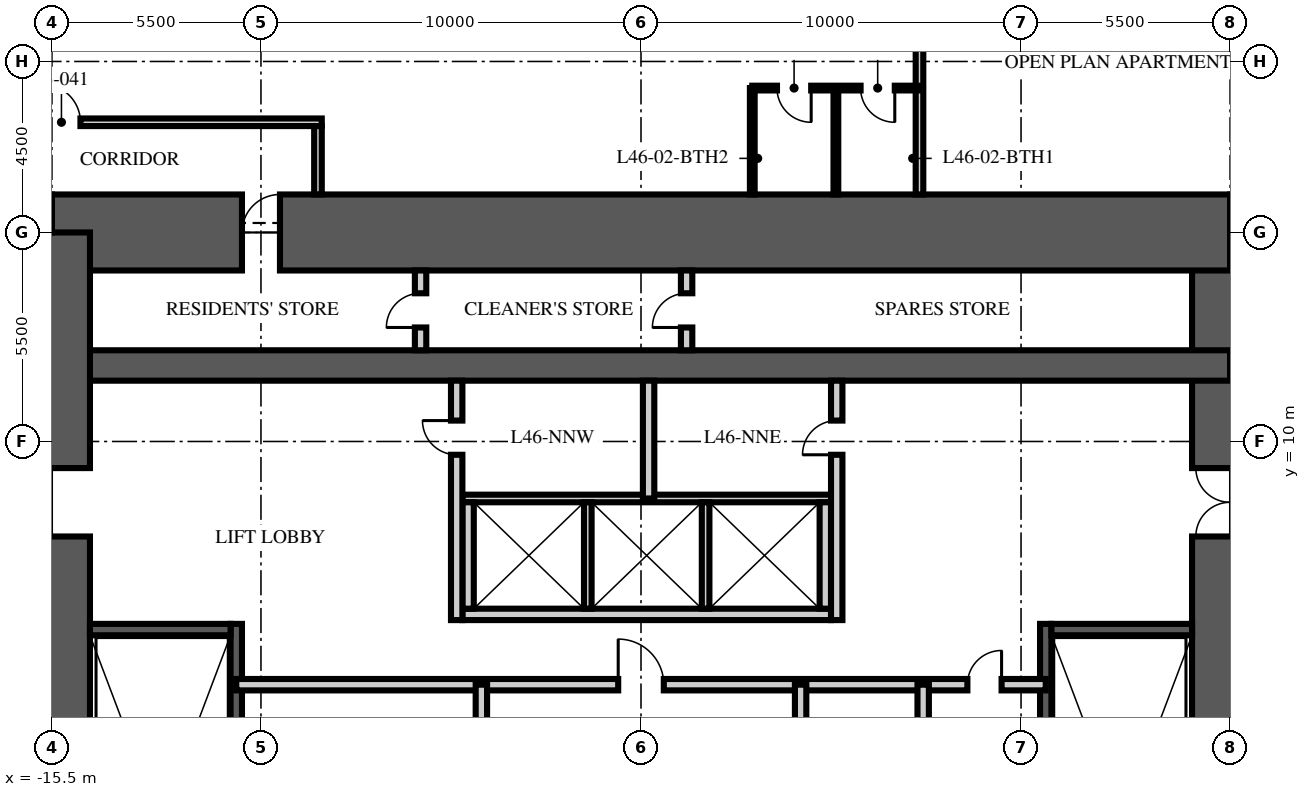
"""IFC4 building model, lengths in metres.
Left out: names, types, materials, properties, quantities, classifications, styles, units other than length and angle.
Written with IfcOpenShell. Run it as: python <this file> out.ifc"""

import sys

from ifc_helpers import new_model, si_unit, direction, frame, frame_2d, origin, place, context, subcontext, project, spatial, rectangle, extrude, element, fill, save


model = new_model("IFC4")
c1 = context("Model", 3, precision=1e-05, world=origin(), true_north=direction((0.0, 1.0)))
c2 = subcontext(c1, "Body", "Model", "MODEL_VIEW")
j1 = project(units=[si_unit("LENGTHUNIT", "METRE"), si_unit("PLANEANGLEUNIT", "RADIAN")], contexts=[c1])
p1 = place(None, origin())
s1 = spatial("IfcSite", under=j1, at=p1, CompositionType="ELEMENT")
p2 = place(p1, origin())
s2 = spatial("IfcBuilding", under=s1, at=p2, CompositionType="ELEMENT")
p3 = place(p2, frame((0.0, 0.0, 182.25)))
s3 = spatial("IfcBuildingStorey", under=s2, at=p3, CompositionType="ELEMENT", Elevation=182.25)
p4 = place(p3, frame((15.5, -15.5, -0.25), z_axis=(0.0, 0.0, 1.0), x_axis=(0.0, 1.0, 0.0)))
e1 = element("IfcWall", 1, at=p4, inside=s3, PredefinedType="SHEAR", context=c2, shape_type="SweptSolid", body=[
    extrude(rectangle(XDim=31.0, YDim=2.0, at=frame_2d((15.5, 0.0))), origin(), (0.0, 0.0, 1.0), 3.7),
])
p5 = place(p4, frame((6.5, 0.0, 0.25)))
e2 = element("IfcOpeningElement", 2, at=p5, cuts=e1, PredefinedType="OPENING", context=c2, shape_type="SweptSolid", body=[
    extrude(rectangle(XDim=1.2, YDim=2.1, at=frame_2d((0.6, 1.05))), frame((0.0, 1.01, 0.0), z_axis=(0.0, -1.0, 0.0), x_axis=(1.0, 0.0, 0.0)), (0.0, 0.0, 1.0), 2.02),
])
p6 = place(p4, frame((23.0, 0.0, 0.25)))
e3 = element("IfcOpeningElement", 3, at=p6, cuts=e1, PredefinedType="OPENING", context=c2, shape_type="SweptSolid", body=[
    extrude(rectangle(XDim=1.8, YDim=2.1, at=frame_2d((0.9, 1.05))), frame((0.0, 1.01, 0.0), z_axis=(0.0, -1.0, 0.0), x_axis=(1.0, 0.0, 0.0)), (0.0, 0.0, 1.0), 2.02),
])
p7 = place(p3, frame((-15.5, 15.5, -0.25), z_axis=(0.0, 0.0, 1.0), x_axis=(1.0, 0.0, 0.0)))
e4 = element("IfcWall", 4, at=p7, inside=s3, PredefinedType="SHEAR", context=c2, shape_type="SweptSolid", body=[
    extrude(rectangle(XDim=31.0, YDim=2.0, at=frame_2d((15.5, 0.0))), origin(), (0.0, 0.0, 1.0), 3.7),
])
p8 = place(p7, frame((5.0, 0.0, 0.25)))
e5 = element("IfcOpeningElement", 5, at=p8, cuts=e4, PredefinedType="OPENING", context=c2, shape_type="SweptSolid", body=[
    extrude(rectangle(XDim=1.0, YDim=2.1, at=frame_2d((0.5, 1.05))), frame((0.0, 1.01, 0.0), z_axis=(0.0, -1.0, 0.0), x_axis=(1.0, 0.0, 0.0)), (0.0, 0.0, 1.0), 2.02),
])
p9 = place(p3, frame((-15.5, 12.0, -0.25), z_axis=(0.0, 0.0, 1.0), x_axis=(1.0, 0.0, 0.0)))
e6 = element("IfcWall", 6, at=p9, inside=s3, PredefinedType="SHEAR", context=c2, shape_type="SweptSolid", body=[
    extrude(rectangle(XDim=31.0, YDim=0.8, at=frame_2d((15.5, 0.0))), origin(), (0.0, 0.0, 1.0), 3.7),
])
p10 = place(p3, frame((-15.5, -15.5, -0.25), z_axis=(0.0, 0.0, 1.0), x_axis=(0.0, 1.0, 0.0)))
e7 = element("IfcWall", 7, at=p10, inside=s3, PredefinedType="SHEAR", context=c2, shape_type="SweptSolid", body=[
    extrude(rectangle(XDim=31.0, YDim=2.0, at=frame_2d((15.5, 0.0))), origin(), (0.0, 0.0, 1.0), 3.7),
])
p11 = place(p10, frame((6.5, 0.0, 0.25)))
e8 = element("IfcOpeningElement", 8, at=p11, cuts=e7, PredefinedType="OPENING", context=c2, shape_type="SweptSolid", body=[
    extrude(rectangle(XDim=1.2, YDim=2.1, at=frame_2d((0.6, 1.05))), frame((0.0, 1.01, 0.0), z_axis=(0.0, -1.0, 0.0), x_axis=(1.0, 0.0, 0.0)), (0.0, 0.0, 1.0), 2.02),
])
p12 = place(p10, frame((23.0, 0.0, 0.25)))
e9 = element("IfcOpeningElement", 9, at=p12, cuts=e7, PredefinedType="OPENING", context=c2, shape_type="SweptSolid", body=[
    extrude(rectangle(XDim=1.8, YDim=2.1, at=frame_2d((0.9, 1.05))), frame((0.0, 1.01, 0.0), z_axis=(0.0, -1.0, 0.0), x_axis=(1.0, 0.0, 0.0)), (0.0, 0.0, 1.0), 2.02),
])
p13 = place(p3, frame((-10.65, -4.9, 0.0), z_axis=(0.0, 0.0, 1.0), x_axis=(0.0, 1.0, 0.0)))
e10 = element("IfcWall", 10, at=p13, inside=s3, PredefinedType="SOLIDWALL", context=c2, shape_type="SweptSolid", body=[
    extrude(rectangle(XDim=10.1, YDim=0.3, at=frame_2d((5.05, 0.0))), origin(), (0.0, 0.0, 1.0), 3.45),
])
p14 = place(p3, frame((-14.5, 5.05, 0.0), z_axis=(0.0, 0.0, 1.0), x_axis=(1.0, 0.0, 0.0)))
e11 = element("IfcWall", 11, at=p14, inside=s3, PredefinedType="SOLIDWALL", context=c2, shape_type="SweptSolid", body=[
    extrude(rectangle(XDim=3.7, YDim=0.3, at=frame_2d((1.85, 0.0))), origin(), (0.0, 0.0, 1.0), 3.45),
])
p15 = place(p3, frame((10.65, -4.9, 0.0), z_axis=(0.0, 0.0, 1.0), x_axis=(0.0, 1.0, 0.0)))
e12 = element("IfcWall", 12, at=p15, inside=s3, PredefinedType="SOLIDWALL", context=c2, shape_type="SweptSolid", body=[
    extrude(rectangle(XDim=10.1, YDim=0.3, at=frame_2d((5.05, 0.0))), origin(), (0.0, 0.0, 1.0), 3.45),
])
p16 = place(p3, frame((14.5, 5.05, 0.0), z_axis=(0.0, 0.0, 1.0), x_axis=(-1.0, 0.0, 0.0)))
e13 = element("IfcWall", 13, at=p16, inside=s3, PredefinedType="SOLIDWALL", context=c2, shape_type="SweptSolid", body=[
    extrude(rectangle(XDim=3.7, YDim=0.3, at=frame_2d((1.85, 0.0))), origin(), (0.0, 0.0, 1.0), 3.45),
])
p17 = place(p3, frame((-4.7, 5.45, 0.0), z_axis=(0.0, 0.0, 1.0), x_axis=(1.0, 0.0, 0.0)))
e14 = element("IfcWall", 14, at=p17, inside=s3, PredefinedType="PARTITIONING", context=c2, shape_type="SweptSolid", body=[
    extrude(rectangle(XDim=9.7, YDim=0.3, at=frame_2d((4.85, 0.0))), origin(), (0.0, 0.0, 1.0), 3.45),
])
p18 = place(p3, frame((-4.7, 8.5, 0.0), z_axis=(0.0, 0.0, 1.0), x_axis=(1.0, 0.0, 0.0)))
e15 = element("IfcWall", 15, at=p18, inside=s3, PredefinedType="PARTITIONING", context=c2, shape_type="SweptSolid", body=[
    extrude(rectangle(XDim=9.7, YDim=0.2, at=frame_2d((4.85, 0.0))), origin(), (0.0, 0.0, 1.0), 3.45),
])
for number, where, z_axis, x_axis in (
    (16, (-4.55, 5.6, 0.0), (0.0, 0.0, 1.0), (0.0, 1.0, 0.0)),
    (17, (4.85, 5.6, 0.0), (0.0, 0.0, 1.0), (0.0, 1.0, 0.0)),
):
    element("IfcWall", number, at=place(p3, frame(where, z_axis=z_axis, x_axis=x_axis)), inside=s3, PredefinedType="PARTITIONING", context=c2, shape_type="SweptSolid", body=[
        extrude(rectangle(XDim=2.8, YDim=0.3, at=frame_2d((1.4, 0.0))), origin(), (0.0, 0.0, 1.0), 3.45),
    ])
for number, where, z_axis, x_axis in (
    (18, (-1.4, 5.6, 0.0), (0.0, 0.0, 1.0), (0.0, 1.0, 0.0)),
    (19, (1.7, 5.6, 0.0), (0.0, 0.0, 1.0), (0.0, 1.0, 0.0)),
):
    element("IfcWall", number, at=place(p3, frame(where, z_axis=z_axis, x_axis=x_axis)), inside=s3, PredefinedType="PARTITIONING", context=c2, shape_type="SweptSolid", body=[
        extrude(rectangle(XDim=2.8, YDim=0.2, at=frame_2d((1.4, 0.0))), origin(), (0.0, 0.0, 1.0), 3.45),
    ])
p19 = place(p3, frame((-10.65, 3.6, 0.0), z_axis=(0.0, 0.0, 1.0), x_axis=(1.0, 0.0, 0.0)))
e20 = element("IfcWall", 20, at=p19, inside=s3, PredefinedType="PARTITIONING", context=c2, shape_type="SweptSolid", body=[
    extrude(rectangle(XDim=21.3, YDim=0.3, at=frame_2d((10.65, 0.0))), origin(), (0.0, 0.0, 1.0), 3.45),
])
p20 = place(p19, frame((10.05, 0.0, 0.0)))
e21 = element("IfcOpeningElement", 21, at=p20, cuts=e20, PredefinedType="OPENING", context=c2, shape_type="SweptSolid", body=[
    extrude(rectangle(XDim=1.2, YDim=2.1, at=frame_2d((0.6, 1.05))), frame((0.0, 0.16, 0.0), z_axis=(0.0, -1.0, 0.0), x_axis=(1.0, 0.0, 0.0)), (0.0, 0.0, 1.0), 0.32),
])
p21 = place(p19, frame((19.238, 0.0, 0.0)))
e22 = element("IfcOpeningElement", 22, at=p21, cuts=e20, PredefinedType="OPENING", context=c2, shape_type="SweptSolid", body=[
    extrude(rectangle(XDim=0.9, YDim=2.1, at=frame_2d((0.45, 1.05))), frame((0.0, 0.16, 0.0), z_axis=(0.0, -1.0, 0.0), x_axis=(1.0, 0.0, 0.0)), (0.0, 0.0, 1.0), 0.32),
])
p22 = place(p3, frame((-4.2, -6.65, 0.0), z_axis=(0.0, 0.0, 1.0), x_axis=(0.0, 1.0, 0.0)))
e23 = element("IfcWall", 23, at=p22, inside=s3, PredefinedType="PARTITIONING", context=c2, shape_type="SweptSolid", body=[
    extrude(rectangle(XDim=10.25, YDim=0.3, at=frame_2d((5.125, 0.0))), origin(), (0.0, 0.0, 1.0), 3.45),
])
p23 = place(p22, frame((0.787, 0.0, 0.0)))
e24 = element("IfcOpeningElement", 24, at=p23, cuts=e23, PredefinedType="OPENING", context=c2, shape_type="SweptSolid", body=[
    extrude(rectangle(XDim=0.9, YDim=2.1, at=frame_2d((0.45, 1.05))), frame((0.0, 0.16, 0.0), z_axis=(0.0, -1.0, 0.0), x_axis=(1.0, 0.0, 0.0)), (0.0, 0.0, 1.0), 0.32),
])
p24 = place(p22, frame((5.912, 0.0, 0.0)))
e25 = element("IfcOpeningElement", 25, at=p24, cuts=e23, PredefinedType="OPENING", context=c2, shape_type="SweptSolid", body=[
    extrude(rectangle(XDim=0.9, YDim=2.1, at=frame_2d((0.45, 1.05))), frame((0.0, 0.16, 0.0), z_axis=(0.0, -1.0, 0.0), x_axis=(1.0, 0.0, 0.0)), (0.0, 0.0, 1.0), 0.32),
])
p25 = place(p3, frame((4.2, -6.65, 0.0), z_axis=(0.0, 0.0, 1.0), x_axis=(0.0, 1.0, 0.0)))
e26 = element("IfcWall", 26, at=p25, inside=s3, PredefinedType="PARTITIONING", context=c2, shape_type="SweptSolid", body=[
    extrude(rectangle(XDim=10.25, YDim=0.3, at=frame_2d((5.125, 0.0))), origin(), (0.0, 0.0, 1.0), 3.45),
])
p26 = place(p25, frame((2.15, 0.0, 0.0)))
e27 = element("IfcOpeningElement", 27, at=p26, cuts=e26, PredefinedType="OPENING", context=c2, shape_type="SweptSolid", body=[
    extrude(rectangle(XDim=0.9, YDim=2.1, at=frame_2d((0.45, 1.05))), frame((0.0, 0.16, 0.0), z_axis=(0.0, -1.0, 0.0), x_axis=(1.0, 0.0, 0.0)), (0.0, 0.0, 1.0), 0.32),
])
p27 = place(p25, frame((7.275, 0.0, 0.0)))
e28 = element("IfcOpeningElement", 28, at=p27, cuts=e26, PredefinedType="OPENING", context=c2, shape_type="SweptSolid", body=[
    extrude(rectangle(XDim=0.9, YDim=2.1, at=frame_2d((0.45, 1.05))), frame((0.0, 0.16, 0.0), z_axis=(0.0, -1.0, 0.0), x_axis=(1.0, 0.0, 0.0)), (0.0, 0.0, 1.0), 0.32),
])
p28 = place(p3, frame((7.425, -1.45, 0.0), z_axis=(0.0, 0.0, 1.0), x_axis=(0.0, 1.0, 0.0)))
e29 = element("IfcWall", 29, at=p28, inside=s3, PredefinedType="PARTITIONING", context=c2, shape_type="SweptSolid", body=[
    extrude(rectangle(XDim=5.05, YDim=0.3, at=frame_2d((2.525, 0.0))), origin(), (0.0, 0.0, 1.0), 3.45),
])
p29 = place(p3, frame((-4.85, 5.3, 0.0), z_axis=(0.0, 0.0, 1.0), x_axis=(0.0, 1.0, 0.0)))
e30 = element("IfcWall", 30, at=p29, inside=s3, PredefinedType="PARTITIONING", context=c2, shape_type="SweptSolid", body=[
    extrude(rectangle(XDim=6.3, YDim=0.3, at=frame_2d((3.15, 0.0))), origin(), (0.0, 0.0, 1.0), 3.45),
])
p30 = place(p29, frame((4.35, 0.0, 0.0)))
e31 = element("IfcOpeningElement", 31, at=p30, cuts=e30, PredefinedType="OPENING", context=c2, shape_type="SweptSolid", body=[
    extrude(rectangle(XDim=0.9, YDim=2.1, at=frame_2d((0.45, 1.05))), frame((0.0, 0.16, 0.0), z_axis=(0.0, -1.0, 0.0), x_axis=(1.0, 0.0, 0.0)), (0.0, 0.0, 1.0), 0.32),
])
p31 = place(p3, frame((5.15, 5.3, 0.0), z_axis=(0.0, 0.0, 1.0), x_axis=(0.0, 1.0, 0.0)))
e32 = element("IfcWall", 32, at=p31, inside=s3, PredefinedType="PARTITIONING", context=c2, shape_type="SweptSolid", body=[
    extrude(rectangle(XDim=6.3, YDim=0.3, at=frame_2d((3.15, 0.0))), origin(), (0.0, 0.0, 1.0), 3.45),
])
p32 = place(p31, frame((4.35, 0.0, 0.0)))
e33 = element("IfcOpeningElement", 33, at=p32, cuts=e32, PredefinedType="OPENING", context=c2, shape_type="SweptSolid", body=[
    extrude(rectangle(XDim=0.9, YDim=2.1, at=frame_2d((0.45, 1.05))), frame((0.0, 0.16, 0.0), z_axis=(0.0, -1.0, 0.0), x_axis=(1.0, 0.0, 0.0)), (0.0, 0.0, 1.0), 0.32),
])
p33 = place(p3, frame((0.2, 8.5, 0.0), z_axis=(0.0, 0.0, 1.0), x_axis=(0.0, 1.0, 0.0)))
e34 = element("IfcWall", 34, at=p33, inside=s3, PredefinedType="PARTITIONING", context=c2, shape_type="SweptSolid", body=[
    extrude(rectangle(XDim=3.1, YDim=0.3, at=frame_2d((1.55, 0.0))), origin(), (0.0, 0.0, 1.0), 3.45),
])
p34 = place(p3, frame((-5.8, 12.4, 0.0), z_axis=(0.0, 0.0, 1.0), x_axis=(0.0, 1.0, 0.0)))
e35 = element("IfcWall", 35, at=p34, inside=s3, PredefinedType="PARTITIONING", context=c2, shape_type="SweptSolid", body=[
    extrude(rectangle(XDim=2.1, YDim=0.3, at=frame_2d((1.05, 0.0))), origin(), (0.0, 0.0, 1.0), 3.45),
])
p35 = place(p34, frame((0.6, 0.0, 0.0)))
e36 = element("IfcOpeningElement", 36, at=p35, cuts=e35, PredefinedType="OPENING", context=c2, shape_type="SweptSolid", body=[
    extrude(rectangle(XDim=0.9, YDim=2.1, at=frame_2d((0.45, 1.05))), frame((0.0, 0.16, 0.0), z_axis=(0.0, -1.0, 0.0), x_axis=(1.0, 0.0, 0.0)), (0.0, 0.0, 1.0), 0.32),
])
p36 = place(p3, frame((1.2, 12.4, 0.0), z_axis=(0.0, 0.0, 1.0), x_axis=(0.0, 1.0, 0.0)))
e37 = element("IfcWall", 37, at=p36, inside=s3, PredefinedType="PARTITIONING", context=c2, shape_type="SweptSolid", body=[
    extrude(rectangle(XDim=2.1, YDim=0.3, at=frame_2d((1.05, 0.0))), origin(), (0.0, 0.0, 1.0), 3.45),
])
p37 = place(p36, frame((0.6, 0.0, 0.0)))
e38 = element("IfcOpeningElement", 38, at=p37, cuts=e37, PredefinedType="OPENING", context=c2, shape_type="SweptSolid", body=[
    extrude(rectangle(XDim=0.9, YDim=2.1, at=frame_2d((0.45, 1.05))), frame((0.0, 0.16, 0.0), z_axis=(0.0, -1.0, 0.0), x_axis=(1.0, 0.0, 0.0)), (0.0, 0.0, 1.0), 0.32),
])
p38 = place(p3, frame((-18.5, 18.4, 0.0), z_axis=(0.0, 0.0, 1.0), x_axis=(1.0, 0.0, 0.0)))
e39 = element("IfcWall", 39, at=p38, inside=s3, PredefinedType="PARTITIONING", context=c2, shape_type="SweptSolid", body=[
    extrude(rectangle(XDim=10.1, YDim=0.2, at=frame_2d((5.05, 0.0))), origin(), (0.0, 0.0, 1.0), 2.25),
])
p39 = place(p38, frame((2.75, 0.0, 0.0)))
e40 = element("IfcOpeningElement", 40, at=p39, cuts=e39, PredefinedType="OPENING", context=c2, shape_type="SweptSolid", body=[
    extrude(rectangle(XDim=1.0, YDim=2.2, at=frame_2d((0.5, 1.1))), frame((0.0, 0.11, 0.0), z_axis=(0.0, -1.0, 0.0), x_axis=(1.0, 0.0, 0.0)), (0.0, 0.0, 1.0), 0.22),
])
p40 = place(p3, frame((-8.5, 18.3, 0.0), z_axis=(0.0, 0.0, 1.0), x_axis=(0.0, -1.0, 0.0)))
e41 = element("IfcWall", 41, at=p40, inside=s3, PredefinedType="PARTITIONING", context=c2, shape_type="SweptSolid", body=[
    extrude(rectangle(XDim=1.8, YDim=0.2, at=frame_2d((0.9, 0.0))), origin(), (0.0, 0.0, 1.0), 3.45),
])
p41 = place(p3, frame((7.328, 16.5, 0.0), z_axis=(0.0, 0.0, 1.0), x_axis=(0.0, 1.0, 0.0)))
e42 = element("IfcWall", 42, at=p41, inside=s3, PredefinedType="PARTITIONING", context=c2, shape_type="SweptSolid", body=[
    extrude(rectangle(XDim=11.65, YDim=0.2, at=frame_2d((5.825, 0.0))), origin(), (0.0, 0.0, 1.0), 2.56),
])
p42 = place(p3, frame((7.328, 19.3, 0.0), z_axis=(0.0, 0.0, 1.0), x_axis=(-1.0, 0.0, 0.0)))
e43 = element("IfcWall", 43, at=p42, inside=s3, PredefinedType="PARTITIONING", context=c2, shape_type="SweptSolid", body=[
    extrude(rectangle(XDim=4.4, YDim=0.125, at=frame_2d((2.2, 0.0))), origin(), (0.0, 0.0, 1.0), 2.56),
])
p43 = place(p42, frame((0.65, 0.0, 0.0)))
e44 = element("IfcOpeningElement", 44, at=p43, cuts=e43, PredefinedType="OPENING", context=c2, shape_type="SweptSolid", body=[
    extrude(rectangle(XDim=0.9, YDim=2.1, at=frame_2d((0.45, 1.05))), frame((0.0, 0.073, 0.0), z_axis=(0.0, -1.0, 0.0), x_axis=(1.0, 0.0, 0.0)), (0.0, 0.0, 1.0), 0.145),
])
p44 = place(p42, frame((2.85, 0.0, 0.0)))
e45 = element("IfcOpeningElement", 45, at=p44, cuts=e43, PredefinedType="OPENING", context=c2, shape_type="SweptSolid", body=[
    extrude(rectangle(XDim=0.9, YDim=2.1, at=frame_2d((0.45, 1.05))), frame((0.0, 0.073, 0.0), z_axis=(0.0, -1.0, 0.0), x_axis=(1.0, 0.0, 0.0)), (0.0, 0.0, 1.0), 0.145),
])
for number, where, z_axis, x_axis in (
    (46, (5.128, 16.5, 0.0), (0.0, 0.0, 1.0), (0.0, 1.0, 0.0)),
    (47, (2.928, 16.5, 0.0), (0.0, 0.0, 1.0), (0.0, 1.0, 0.0)),
):
    element("IfcWall", number, at=place(p3, frame(where, z_axis=z_axis, x_axis=x_axis)), inside=s3, PredefinedType="PARTITIONING", context=c2, shape_type="SweptSolid", body=[
        extrude(rectangle(XDim=2.8, YDim=0.125, at=frame_2d((1.4, 0.0))), origin(), (0.0, 0.0, 1.0), 3.45),
    ])
p45 = place(p12, origin())
e48 = element("IfcDoor", 48, at=p45, inside=s3, OperationType="DOUBLE_DOOR_SINGLE_SWING", PredefinedType="DOOR", context=c2, shape_type="SweptSolid", body=[
    extrude(rectangle(XDim=1.8, YDim=2.1, at=frame_2d((0.9, 1.05))), frame((0.0, 0.025, 0.0), z_axis=(0.0, -1.0, 0.0), x_axis=(1.0, 0.0, 0.0)), (0.0, 0.0, 1.0), 0.05),
])
fill(e9, e48)
p46 = place(p6, origin())
e49 = element("IfcDoor", 49, at=p46, inside=s3, OperationType="DOUBLE_DOOR_SINGLE_SWING", PredefinedType="DOOR", context=c2, shape_type="SweptSolid", body=[
    extrude(rectangle(XDim=1.8, YDim=2.1, at=frame_2d((0.9, 1.05))), frame((0.0, 0.025, 0.0), z_axis=(0.0, -1.0, 0.0), x_axis=(1.0, 0.0, 0.0)), (0.0, 0.0, 1.0), 0.05),
])
fill(e3, e49)
p47 = place(p20, origin())
e50 = element("IfcDoor", 50, at=p47, inside=s3, OperationType="SINGLE_SWING_LEFT", PredefinedType="DOOR", context=c2, shape_type="SweptSolid", body=[
    extrude(rectangle(XDim=1.2, YDim=2.1, at=frame_2d((0.6, 1.05))), frame((0.0, 0.025, 0.0), z_axis=(0.0, -1.0, 0.0), x_axis=(1.0, 0.0, 0.0)), (0.0, 0.0, 1.0), 0.05),
])
fill(e21, e50)
p48 = place(p21, origin())
e51 = element("IfcDoor", 51, at=p48, inside=s3, OperationType="SINGLE_SWING_RIGHT", PredefinedType="DOOR", context=c2, shape_type="SweptSolid", body=[
    extrude(rectangle(XDim=0.9, YDim=2.1, at=frame_2d((0.45, 1.05))), frame((0.0, 0.025, 0.0), z_axis=(0.0, -1.0, 0.0), x_axis=(1.0, 0.0, 0.0)), (0.0, 0.0, 1.0), 0.05),
])
fill(e22, e51)
p49 = place(p30, origin())
e52 = element("IfcDoor", 52, at=p49, inside=s3, OperationType="SINGLE_SWING_RIGHT", PredefinedType="DOOR", context=c2, shape_type="SweptSolid", body=[
    extrude(rectangle(XDim=0.9, YDim=2.1, at=frame_2d((0.45, 1.05))), frame((0.0, 0.025, 0.0), z_axis=(0.0, -1.0, 0.0), x_axis=(1.0, 0.0, 0.0)), (0.0, 0.0, 1.0), 0.05),
])
fill(e31, e52)
p50 = place(p32, origin())
e53 = element("IfcDoor", 53, at=p50, inside=s3, OperationType="SINGLE_SWING_LEFT", PredefinedType="DOOR", context=c2, shape_type="SweptSolid", body=[
    extrude(rectangle(XDim=0.9, YDim=2.1, at=frame_2d((0.45, 1.05))), frame((0.0, 0.025, 0.0), z_axis=(0.0, -1.0, 0.0), x_axis=(1.0, 0.0, 0.0)), (0.0, 0.0, 1.0), 0.05),
])
fill(e33, e53)
p51 = place(p35, origin())
e54 = element("IfcDoor", 54, at=p51, inside=s3, OperationType="SINGLE_SWING_LEFT", PredefinedType="DOOR", context=c2, shape_type="SweptSolid", body=[
    extrude(rectangle(XDim=0.9, YDim=2.1, at=frame_2d((0.45, 1.05))), frame((0.0, 0.025, 0.0), z_axis=(0.0, -1.0, 0.0), x_axis=(1.0, 0.0, 0.0)), (0.0, 0.0, 1.0), 0.05),
])
fill(e36, e54)
p52 = place(p37, origin())
e55 = element("IfcDoor", 55, at=p52, inside=s3, OperationType="SINGLE_SWING_LEFT", PredefinedType="DOOR", context=c2, shape_type="SweptSolid", body=[
    extrude(rectangle(XDim=0.9, YDim=2.1, at=frame_2d((0.45, 1.05))), frame((0.0, 0.025, 0.0), z_axis=(0.0, -1.0, 0.0), x_axis=(1.0, 0.0, 0.0)), (0.0, 0.0, 1.0), 0.05),
])
fill(e38, e55)
p53 = place(p8, origin())
e56 = element("IfcDoor", 56, at=p53, inside=s3, OperationType="SINGLE_SWING_RIGHT", PredefinedType="DOOR", context=c2, shape_type="SweptSolid", body=[
    extrude(rectangle(XDim=1.0, YDim=2.1, at=frame_2d((0.5, 1.05))), frame((0.0, 0.025, 0.0), z_axis=(0.0, -1.0, 0.0), x_axis=(1.0, 0.0, 0.0)), (0.0, 0.0, 1.0), 0.05),
])
fill(e5, e56)
p54 = place(p43, origin())
e57 = element("IfcDoor", 57, at=p54, inside=s3, OperationType="SINGLE_SWING_LEFT", PredefinedType="DOOR", context=c2, shape_type="SweptSolid", body=[
    extrude(rectangle(XDim=0.9, YDim=2.1, at=frame_2d((0.45, 1.05))), frame((0.0, 0.025, 0.0), z_axis=(0.0, -1.0, 0.0), x_axis=(1.0, 0.0, 0.0)), (0.0, 0.0, 1.0), 0.05),
])
fill(e44, e57)
p55 = place(p44, origin())
e58 = element("IfcDoor", 58, at=p55, inside=s3, OperationType="SINGLE_SWING_LEFT", PredefinedType="DOOR", context=c2, shape_type="SweptSolid", body=[
    extrude(rectangle(XDim=0.9, YDim=2.1, at=frame_2d((0.45, 1.05))), frame((0.0, 0.025, 0.0), z_axis=(0.0, -1.0, 0.0), x_axis=(1.0, 0.0, 0.0)), (0.0, 0.0, 1.0), 0.05),
])
fill(e45, e58)
p56 = place(p39, origin())
e59 = element("IfcDoor", 59, at=p56, inside=s3, OperationType="SINGLE_SWING_LEFT", PredefinedType="DOOR", context=c2, shape_type="SweptSolid", body=[
    extrude(rectangle(XDim=1.0, YDim=2.2, at=frame_2d((0.5, 1.1))), frame((0.0, 0.025, 0.0), z_axis=(0.0, -1.0, 0.0), x_axis=(1.0, 0.0, 0.0)), (0.0, 0.0, 1.0), 0.05),
])
fill(e40, e59)
save(model, sys.argv[1])
